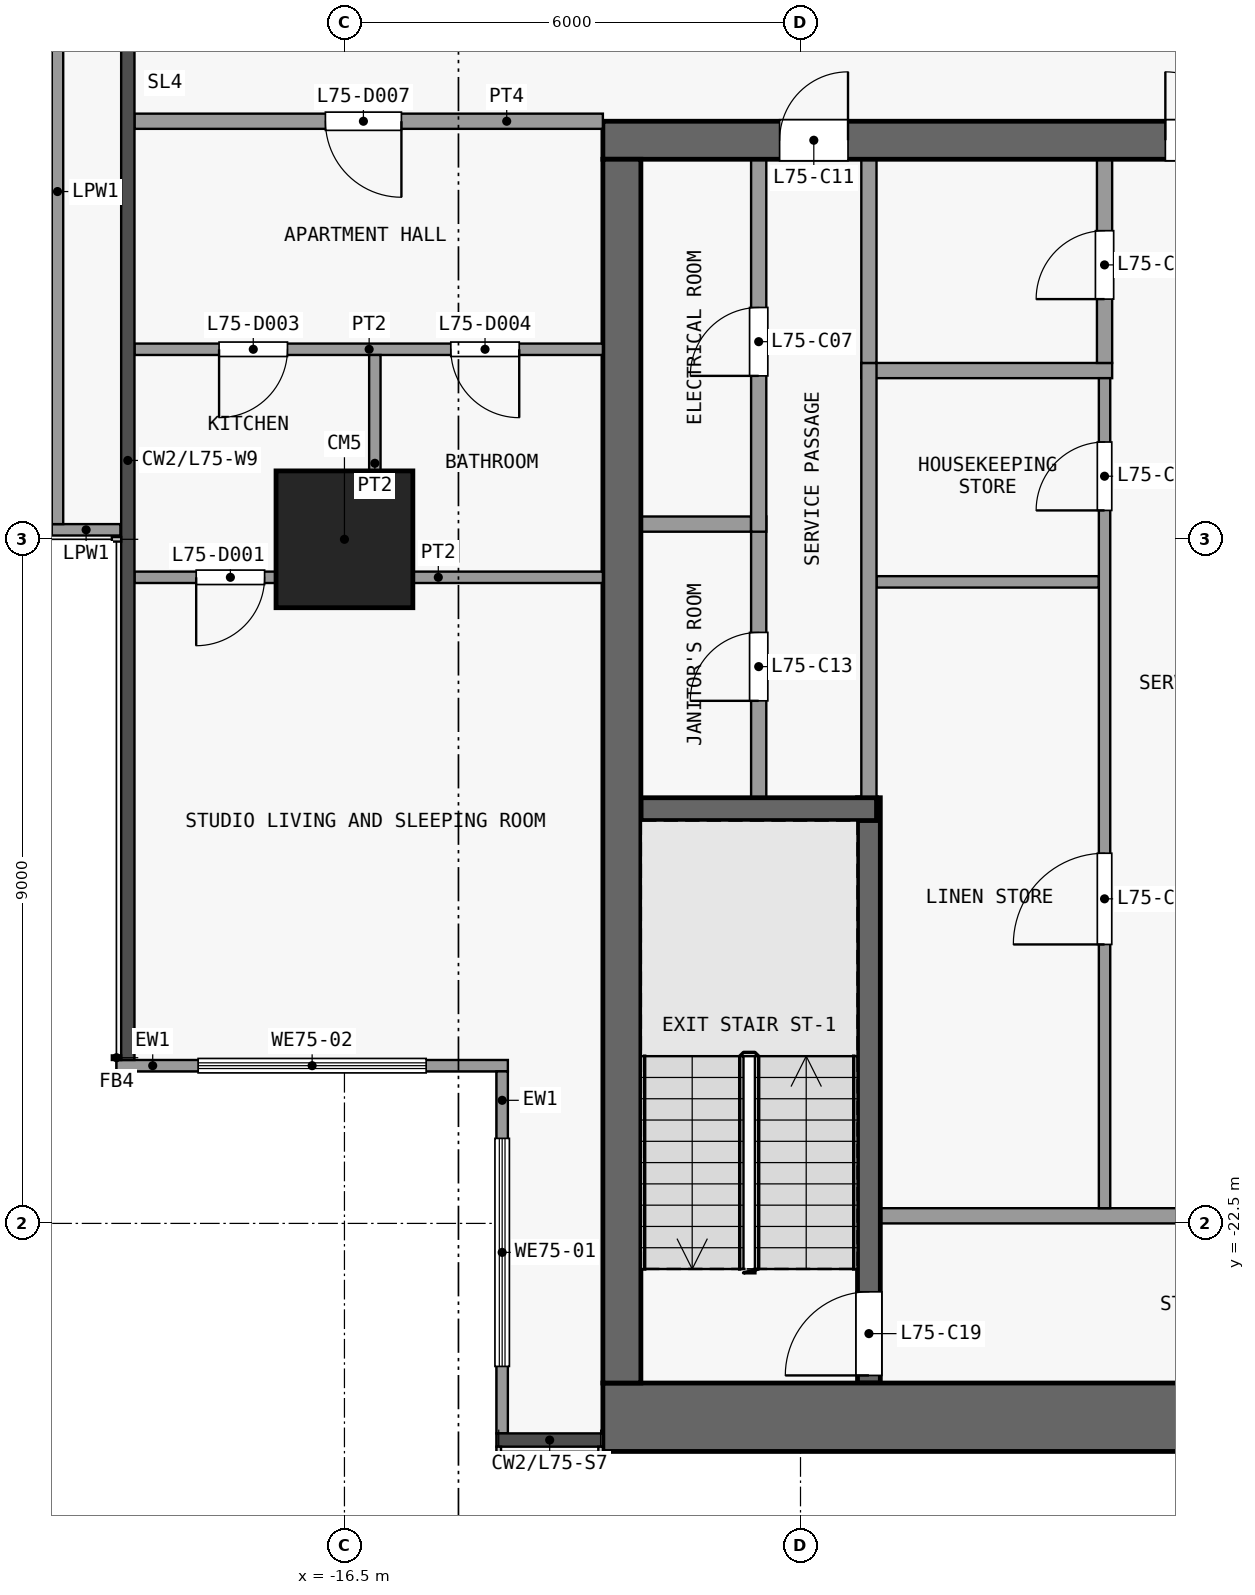
"""IFC4 building model, lengths in metres.
Left out: names, types, materials, properties, quantities, classifications, styles, units other than length and angle.
Written with IfcOpenShell. Run it as: python <this file> out.ifc"""

import sys

from ifc_helpers import new_model, si_unit, direction, frame, frame_2d, origin, origin_2d, place, context, subcontext, project, spatial, rectangle, extrude, element, fill, save


model = new_model("IFC4")
c1 = context("Model", 3, precision=1e-05, world=origin(), true_north=direction((0.0, 1.0)))
c2 = subcontext(c1, "Body", "Model", "MODEL_VIEW")
j1 = project(units=[si_unit("LENGTHUNIT", "METRE"), si_unit("PLANEANGLEUNIT", "RADIAN")], contexts=[c1])
p1 = place(None, origin())
s1 = spatial("IfcSite", under=j1, at=p1, CompositionType="ELEMENT")
p2 = place(p1, origin())
s2 = spatial("IfcBuilding", under=s1, at=p2, CompositionType="ELEMENT")
p3 = place(p2, frame((0.0, 0.0, 295.1)))
s3 = spatial("IfcBuildingStorey", under=s2, at=p3, CompositionType="ELEMENT", Elevation=295.1)
p4 = place(p3, frame((-16.5, -13.5, 0.0), z_axis=(0.0, 0.0, 1.0), x_axis=(1.0, 0.0, 0.0)))
e1 = element("IfcColumn", 1, at=p4, inside=s3, PredefinedType="COLUMN", context=c2, shape_type="SweptSolid", body=[
    extrude(rectangle(XDim=1.8, YDim=1.8, at=origin_2d()), origin(), (0.0, 0.0, 1.0), 3.6),
])
p5 = place(p3, frame((-13.1, -25.05, 0.0), z_axis=(0.0, 0.0, 1.0), x_axis=(1.0, 0.0, 0.0)))
e2 = element("IfcWall", 2, at=p5, inside=s3, PredefinedType="SHEAR", context=c2, shape_type="SweptSolid", body=[
    extrude(rectangle(XDim=26.2, YDim=0.9, at=frame_2d((13.1, 0.0))), origin(), (0.0, 0.0, 1.0), 3.2),
])
p6 = place(p3, frame((-13.1, -8.25, 0.0), z_axis=(0.0, 0.0, 1.0), x_axis=(1.0, 0.0, 0.0)))
e3 = element("IfcWall", 3, at=p6, inside=s3, PredefinedType="SHEAR", context=c2, shape_type="SweptSolid", body=[
    extrude(rectangle(XDim=26.2, YDim=0.5, at=frame_2d((13.1, 0.0))), origin(), (0.0, 0.0, 1.0), 3.2),
])
p7 = place(p6, frame((7.4, 0.0, 0.0)))
e4 = element("IfcOpeningElement", 4, at=p7, cuts=e3, PredefinedType="OPENING", context=c2, shape_type="SweptSolid", body=[
    extrude(rectangle(XDim=1.8, YDim=2.1, at=frame_2d((0.9, 1.05))), frame((0.0, 0.26, 0.0), z_axis=(0.0, -1.0, 0.0), x_axis=(1.0, 0.0, 0.0)), (0.0, 0.0, 1.0), 0.52),
])
p8 = place(p6, frame((17.0, 0.0, 0.0)))
e5 = element("IfcOpeningElement", 5, at=p8, cuts=e3, PredefinedType="OPENING", context=c2, shape_type="SweptSolid", body=[
    extrude(rectangle(XDim=1.8, YDim=2.1, at=frame_2d((0.9, 1.05))), frame((0.0, 0.26, 0.0), z_axis=(0.0, -1.0, 0.0), x_axis=(1.0, 0.0, 0.0)), (0.0, 0.0, 1.0), 0.52),
])
p9 = place(p6, frame((2.325, 0.0, 0.0)))
e6 = element("IfcOpeningElement", 6, at=p9, cuts=e3, PredefinedType="OPENING", context=c2, shape_type="SweptSolid", body=[
    extrude(rectangle(XDim=0.9, YDim=2.1, at=frame_2d((0.45, 1.05))), frame((0.0, 0.26, 0.0), z_axis=(0.0, -1.0, 0.0), x_axis=(1.0, 0.0, 0.0)), (0.0, 0.0, 1.0), 0.52),
])
p10 = place(p6, frame((22.975, 0.0, 0.0)))
e7 = element("IfcOpeningElement", 7, at=p10, cuts=e3, PredefinedType="OPENING", context=c2, shape_type="SweptSolid", body=[
    extrude(rectangle(XDim=0.9, YDim=2.1, at=frame_2d((0.45, 1.05))), frame((0.0, 0.26, 0.0), z_axis=(0.0, -1.0, 0.0), x_axis=(1.0, 0.0, 0.0)), (0.0, 0.0, 1.0), 0.52),
])
p11 = place(p3, frame((-12.85, -24.6, 0.0), z_axis=(0.0, 0.0, 1.0), x_axis=(0.0, 1.0, 0.0)))
e8 = element("IfcWall", 8, at=p11, inside=s3, PredefinedType="SHEAR", context=c2, shape_type="SweptSolid", body=[
    extrude(rectangle(XDim=16.1, YDim=0.5, at=frame_2d((8.05, 0.0))), origin(), (0.0, 0.0, 1.0), 3.2),
])
p12 = place(p3, frame((-3.25, -22.4, 0.0), z_axis=(0.0, 0.0, 1.0), x_axis=(-1.0, 0.0, 0.0)))
e9 = element("IfcWall", 9, at=p12, inside=s3, PredefinedType="PARTITIONING", context=c2, shape_type="SweptSolid", body=[
    extrude(rectangle(XDim=6.2, YDim=0.2, at=frame_2d((3.1, 0.0))), origin(), (0.0, 0.0, 1.0), 3.2),
])
p13 = place(p12, frame((0.8, 0.0, 0.0)))
e10 = element("IfcOpeningElement", 10, at=p13, cuts=e9, PredefinedType="OPENING", context=c2, shape_type="SweptSolid", body=[
    extrude(rectangle(XDim=1.5, YDim=2.1, at=frame_2d((0.75, 1.05))), frame((0.0, 0.11, 0.0), z_axis=(0.0, -1.0, 0.0), x_axis=(1.0, 0.0, 0.0)), (0.0, 0.0, 1.0), 0.22),
])
p14 = place(p3, frame((-12.6, -17.05, 0.0), z_axis=(0.0, 0.0, 1.0), x_axis=(1.0, 0.0, 0.0)))
e11 = element("IfcWall", 11, at=p14, inside=s3, PredefinedType="SHEAR", context=c2, shape_type="SweptSolid", body=[
    extrude(rectangle(XDim=3.1, YDim=0.3, at=frame_2d((1.55, 0.0))), origin(), (0.0, 0.0, 1.0), 3.2),
])
p15 = place(p3, frame((-9.5, -14.06, 0.0), z_axis=(0.0, 0.0, 1.0), x_axis=(1.0, 0.0, 0.0)))
e12 = element("IfcWall", 12, at=p15, inside=s3, PredefinedType="PARTITIONING", context=c2, shape_type="SweptSolid", body=[
    extrude(rectangle(XDim=2.925, YDim=0.15, at=frame_2d((1.462, 0.0))), origin(), (0.0, 0.0, 1.0), 3.2),
])
p16 = place(p3, frame((-12.6, -13.3, 0.0), z_axis=(0.0, 0.0, 1.0), x_axis=(1.0, 0.0, 0.0)))
e13 = element("IfcWall", 13, at=p16, inside=s3, PredefinedType="PARTITIONING", context=c2, shape_type="SweptSolid", body=[
    extrude(rectangle(XDim=1.45, YDim=0.2, at=frame_2d((0.725, 0.0))), origin(), (0.0, 0.0, 1.0), 3.2),
])
p17 = place(p3, frame((-9.7, -11.28, 0.0), z_axis=(0.0, 0.0, 1.0), x_axis=(1.0, 0.0, 0.0)))
e14 = element("IfcWall", 14, at=p17, inside=s3, PredefinedType="PARTITIONING", context=c2, shape_type="SweptSolid", body=[
    extrude(rectangle(XDim=3.3, YDim=0.2, at=frame_2d((1.65, 0.0))), origin(), (0.0, 0.0, 1.0), 3.2),
])
p18 = place(p3, frame((-11.05, -16.9, 0.0), z_axis=(0.0, 0.0, 1.0), x_axis=(0.0, 1.0, 0.0)))
e15 = element("IfcWall", 15, at=p18, inside=s3, PredefinedType="PARTITIONING", context=c2, shape_type="SweptSolid", body=[
    extrude(rectangle(XDim=3.7, YDim=0.2, at=frame_2d((1.85, 0.0))), origin(), (0.0, 0.0, 1.0), 3.2),
])
p19 = place(p18, frame((1.275, 0.0, 0.0)))
e16 = element("IfcOpeningElement", 16, at=p19, cuts=e15, PredefinedType="OPENING", context=c2, shape_type="SweptSolid", body=[
    extrude(rectangle(XDim=0.9, YDim=2.1, at=frame_2d((0.45, 1.05))), frame((0.0, 0.11, 0.0), z_axis=(0.0, -1.0, 0.0), x_axis=(1.0, 0.0, 0.0)), (0.0, 0.0, 1.0), 0.22),
])
p20 = place(p3, frame((-11.05, -13.4, 0.0), z_axis=(0.0, 0.0, 1.0), x_axis=(0.0, 1.0, 0.0)))
e17 = element("IfcWall", 17, at=p20, inside=s3, PredefinedType="PARTITIONING", context=c2, shape_type="SweptSolid", body=[
    extrude(rectangle(XDim=4.9, YDim=0.2, at=frame_2d((2.45, 0.0))), origin(), (0.0, 0.0, 1.0), 3.2),
])
p21 = place(p20, frame((2.05, 0.0, 0.0)))
e18 = element("IfcOpeningElement", 18, at=p21, cuts=e17, PredefinedType="OPENING", context=c2, shape_type="SweptSolid", body=[
    extrude(rectangle(XDim=0.9, YDim=2.1, at=frame_2d((0.45, 1.05))), frame((0.0, 0.11, 0.0), z_axis=(0.0, -1.0, 0.0), x_axis=(1.0, 0.0, 0.0)), (0.0, 0.0, 1.0), 0.22),
])
p22 = place(p3, frame((-9.6, -24.6, 0.0), z_axis=(0.0, 0.0, 1.0), x_axis=(0.0, 1.0, 0.0)))
e19 = element("IfcWall", 19, at=p22, inside=s3, PredefinedType="SHEAR", context=c2, shape_type="SweptSolid", body=[
    extrude(rectangle(XDim=7.7, YDim=0.3, at=frame_2d((3.85, 0.0))), origin(), (0.0, 0.0, 1.0), 3.2),
])
p23 = place(p22, frame((0.1, 0.0, 0.0)))
e20 = element("IfcOpeningElement", 20, at=p23, cuts=e19, PredefinedType="OPENING", context=c2, shape_type="SweptSolid", body=[
    extrude(rectangle(XDim=1.1, YDim=2.1, at=frame_2d((0.55, 1.05))), frame((0.0, 0.16, 0.0), z_axis=(0.0, -1.0, 0.0), x_axis=(1.0, 0.0, 0.0)), (0.0, 0.0, 1.0), 0.32),
])
p24 = place(p3, frame((-9.6, -16.9, 0.0), z_axis=(0.0, 0.0, 1.0), x_axis=(0.0, 1.0, 0.0)))
e21 = element("IfcWall", 21, at=p24, inside=s3, PredefinedType="PARTITIONING", context=c2, shape_type="SweptSolid", body=[
    extrude(rectangle(XDim=5.72, YDim=0.2, at=frame_2d((2.86, 0.0))), origin(), (0.0, 0.0, 1.0), 3.2),
])
p25 = place(p3, frame((-9.6, -11.18, 0.0), z_axis=(0.0, 0.0, 1.0), x_axis=(0.0, 1.0, 0.0)))
e22 = element("IfcWall", 22, at=p25, inside=s3, PredefinedType="PARTITIONING", context=c2, shape_type="SweptSolid", body=[
    extrude(rectangle(XDim=2.68, YDim=0.2, at=frame_2d((1.34, 0.0))), origin(), (0.0, 0.0, 1.0), 3.2),
])
p26 = place(p3, frame((-6.5, -22.3, 0.0), z_axis=(0.0, 0.0, 1.0), x_axis=(0.0, 1.0, 0.0)))
e23 = element("IfcWall", 23, at=p26, inside=s3, PredefinedType="PARTITIONING", context=c2, shape_type="SweptSolid", body=[
    extrude(rectangle(XDim=10.92, YDim=0.15, at=frame_2d((5.46, 0.0))), origin(), (0.0, 0.0, 1.0), 3.2),
])
p27 = place(p26, frame((3.47, 0.0, 0.0)))
e24 = element("IfcOpeningElement", 24, at=p27, cuts=e23, PredefinedType="OPENING", context=c2, shape_type="SweptSolid", body=[
    extrude(rectangle(XDim=1.2, YDim=2.1, at=frame_2d((0.6, 1.05))), frame((0.0, 0.085, 0.0), z_axis=(0.0, -1.0, 0.0), x_axis=(1.0, 0.0, 0.0)), (0.0, 0.0, 1.0), 0.17),
])
p28 = place(p26, frame((9.18, 0.0, 0.0)))
e25 = element("IfcOpeningElement", 25, at=p28, cuts=e23, PredefinedType="OPENING", context=c2, shape_type="SweptSolid", body=[
    extrude(rectangle(XDim=0.9, YDim=2.1, at=frame_2d((0.45, 1.05))), frame((0.0, 0.085, 0.0), z_axis=(0.0, -1.0, 0.0), x_axis=(1.0, 0.0, 0.0)), (0.0, 0.0, 1.0), 0.17),
])
p29 = place(p3, frame((-6.5, -11.18, 0.0), z_axis=(0.0, 0.0, 1.0), x_axis=(0.0, 1.0, 0.0)))
e26 = element("IfcWall", 26, at=p29, inside=s3, PredefinedType="PARTITIONING", context=c2, shape_type="SweptSolid", body=[
    extrude(rectangle(XDim=2.68, YDim=0.2, at=frame_2d((1.34, 0.0))), origin(), (0.0, 0.0, 1.0), 3.2),
])
p30 = place(p29, frame((0.84, 0.0, 0.0)))
e27 = element("IfcOpeningElement", 27, at=p30, cuts=e26, PredefinedType="OPENING", context=c2, shape_type="SweptSolid", body=[
    extrude(rectangle(XDim=0.9, YDim=2.1, at=frame_2d((0.45, 1.05))), frame((0.0, 0.11, 0.0), z_axis=(0.0, -1.0, 0.0), x_axis=(1.0, 0.0, 0.0)), (0.0, 0.0, 1.0), 0.22),
])
p31 = place(p3, frame((-14.425, -25.262, 0.0), z_axis=(0.0, 0.0, 1.0), x_axis=(0.0, 1.0, 0.0)))
e28 = element("IfcWall", 28, at=p31, inside=s3, PredefinedType="SOLIDWALL", context=c2, shape_type="SweptSolid", body=[
    extrude(rectangle(XDim=4.762, YDim=0.15, at=frame_2d((2.381, 0.0))), origin(), (0.0, 0.0, 1.0), 3.2),
])
p32 = place(p31, frame((0.881, 0.0, 0.9)))
e29 = element("IfcOpeningElement", 29, at=p32, cuts=e28, PredefinedType="OPENING", context=c2, shape_type="SweptSolid", body=[
    extrude(rectangle(XDim=3.0, YDim=2.4, at=frame_2d((1.5, 1.2))), frame((0.0, 0.085, 0.0), z_axis=(0.0, -1.0, 0.0), x_axis=(1.0, 0.0, 0.0)), (0.0, 0.0, 1.0), 0.17),
])
p33 = place(p3, frame((-14.35, -20.425, 0.0), z_axis=(0.0, 0.0, 1.0), x_axis=(-1.0, 0.0, 0.0)))
e30 = element("IfcWall", 30, at=p33, inside=s3, PredefinedType="SOLIDWALL", context=c2, shape_type="SweptSolid", body=[
    extrude(rectangle(XDim=5.15, YDim=0.15, at=frame_2d((2.575, 0.0))), origin(), (0.0, 0.0, 1.0), 3.2),
])
p34 = place(p33, frame((1.075, 0.0, 0.9)))
e31 = element("IfcOpeningElement", 31, at=p34, cuts=e30, PredefinedType="OPENING", context=c2, shape_type="SweptSolid", body=[
    extrude(rectangle(XDim=3.0, YDim=2.4, at=frame_2d((1.5, 1.2))), frame((0.0, 0.085, 0.0), z_axis=(0.0, -1.0, 0.0), x_axis=(1.0, 0.0, 0.0)), (0.0, 0.0, 1.0), 0.17),
])
p35 = place(p3, frame((-19.448, -13.375, 0.0), z_axis=(0.0, 0.0, 1.0), x_axis=(-1.0, 0.0, 0.0)))
e32 = element("IfcWall", 32, at=p35, inside=s3, PredefinedType="PARAPET", context=c2, shape_type="SweptSolid", body=[
    extrude(rectangle(XDim=0.903, YDim=0.15, at=frame_2d((0.451, 0.0))), origin(), (0.0, 0.0, 1.0), 1.15),
])
p36 = place(p3, frame((-20.275, -13.3, 0.0), z_axis=(0.0, 0.0, 1.0), x_axis=(0.0, 1.0, 0.0)))
e33 = element("IfcWall", 33, at=p36, inside=s3, PredefinedType="PARAPET", context=c2, shape_type="SweptSolid", body=[
    extrude(rectangle(XDim=8.75, YDim=0.15, at=frame_2d((4.375, 0.0))), origin(), (0.0, 0.0, 1.0), 1.15),
])
p37 = place(p3, frame((-19.262, -14.0, 0.0), z_axis=(0.0, 0.0, 1.0), x_axis=(1.0, 0.0, 0.0)))
e34 = element("IfcWall", 34, at=p37, inside=s3, PredefinedType="PARTITIONING", context=c2, shape_type="SweptSolid", body=[
    extrude(rectangle(XDim=6.162, YDim=0.15, at=frame_2d((3.081, 0.0))), origin(), (0.0, 0.0, 1.0), 3.2),
])
p38 = place(p37, frame((0.812, 0.0, 0.0)))
e35 = element("IfcOpeningElement", 35, at=p38, cuts=e34, PredefinedType="OPENING", context=c2, shape_type="SweptSolid", body=[
    extrude(rectangle(XDim=0.9, YDim=2.1, at=frame_2d((0.45, 1.05))), frame((0.0, 0.085, 0.0), z_axis=(0.0, -1.0, 0.0), x_axis=(1.0, 0.0, 0.0)), (0.0, 0.0, 1.0), 0.17),
])
p39 = place(p3, frame((-19.262, -11.0, 0.0), z_axis=(0.0, 0.0, 1.0), x_axis=(1.0, 0.0, 0.0)))
e36 = element("IfcWall", 36, at=p39, inside=s3, PredefinedType="PARTITIONING", context=c2, shape_type="SweptSolid", body=[
    extrude(rectangle(XDim=6.162, YDim=0.15, at=frame_2d((3.081, 0.0))), origin(), (0.0, 0.0, 1.0), 3.2),
])
p40 = place(p39, frame((1.113, 0.0, 0.0)))
e37 = element("IfcOpeningElement", 37, at=p40, cuts=e36, PredefinedType="OPENING", context=c2, shape_type="SweptSolid", body=[
    extrude(rectangle(XDim=0.9, YDim=2.1, at=frame_2d((0.45, 1.05))), frame((0.0, 0.085, 0.0), z_axis=(0.0, -1.0, 0.0), x_axis=(1.0, 0.0, 0.0)), (0.0, 0.0, 1.0), 0.17),
])
p41 = place(p39, frame((4.162, 0.0, 0.0)))
e38 = element("IfcOpeningElement", 38, at=p41, cuts=e36, PredefinedType="OPENING", context=c2, shape_type="SweptSolid", body=[
    extrude(rectangle(XDim=0.9, YDim=2.1, at=frame_2d((0.45, 1.05))), frame((0.0, 0.085, 0.0), z_axis=(0.0, -1.0, 0.0), x_axis=(1.0, 0.0, 0.0)), (0.0, 0.0, 1.0), 0.17),
])
p42 = place(p3, frame((-19.262, -8.0, 0.0), z_axis=(0.0, 0.0, 1.0), x_axis=(1.0, 0.0, 0.0)))
e39 = element("IfcWall", 39, at=p42, inside=s3, PredefinedType="PARTITIONING", context=c2, shape_type="SweptSolid", body=[
    extrude(rectangle(XDim=6.162, YDim=0.2, at=frame_2d((3.081, 0.0))), origin(), (0.0, 0.0, 1.0), 3.2),
])
p43 = place(p42, frame((2.512, 0.0, 0.0)))
e40 = element("IfcOpeningElement", 40, at=p43, cuts=e39, PredefinedType="OPENING", context=c2, shape_type="SweptSolid", body=[
    extrude(rectangle(XDim=1.0, YDim=2.1, at=frame_2d((0.5, 1.05))), frame((0.0, 0.11, 0.0), z_axis=(0.0, -1.0, 0.0), x_axis=(1.0, 0.0, 0.0)), (0.0, 0.0, 1.0), 0.22),
])
p44 = place(p3, frame((-16.1, -13.925, 0.0), z_axis=(0.0, 0.0, 1.0), x_axis=(0.0, 1.0, 0.0)))
e41 = element("IfcWall", 41, at=p44, inside=s3, PredefinedType="PARTITIONING", context=c2, shape_type="SweptSolid", body=[
    extrude(rectangle(XDim=2.85, YDim=0.15, at=frame_2d((1.425, 0.0))), origin(), (0.0, 0.0, 1.0), 3.2),
])
p45 = place(p7, origin())
e42 = element("IfcDoor", 42, at=p45, inside=s3, OperationType="DOUBLE_DOOR_SINGLE_SWING", PredefinedType="DOOR", context=c2, shape_type="SweptSolid", body=[
    extrude(rectangle(XDim=1.8, YDim=2.1, at=frame_2d((0.9, 1.05))), frame((0.0, 0.025, 0.0), z_axis=(0.0, -1.0, 0.0), x_axis=(1.0, 0.0, 0.0)), (0.0, 0.0, 1.0), 0.05),
])
fill(e4, e42)
p46 = place(p21, origin())
e43 = element("IfcDoor", 43, at=p46, inside=s3, OperationType="SINGLE_SWING_LEFT", PredefinedType="DOOR", context=c2, shape_type="SweptSolid", body=[
    extrude(rectangle(XDim=0.9, YDim=2.1, at=frame_2d((0.45, 1.05))), frame((0.0, 0.025, 0.0), z_axis=(0.0, -1.0, 0.0), x_axis=(1.0, 0.0, 0.0)), (0.0, 0.0, 1.0), 0.05),
])
fill(e18, e43)
p47 = place(p30, origin())
e44 = element("IfcDoor", 44, at=p47, inside=s3, OperationType="SINGLE_SWING_LEFT", PredefinedType="DOOR", context=c2, shape_type="SweptSolid", body=[
    extrude(rectangle(XDim=0.9, YDim=2.1, at=frame_2d((0.45, 1.05))), frame((0.0, 0.025, 0.0), z_axis=(0.0, -1.0, 0.0), x_axis=(1.0, 0.0, 0.0)), (0.0, 0.0, 1.0), 0.05),
])
fill(e27, e44)
p48 = place(p9, origin())
e45 = element("IfcDoor", 45, at=p48, inside=s3, OperationType="SINGLE_SWING_RIGHT", PredefinedType="DOOR", context=c2, shape_type="SweptSolid", body=[
    extrude(rectangle(XDim=0.9, YDim=2.1, at=frame_2d((0.45, 1.05))), frame((0.0, 0.025, 0.0), z_axis=(0.0, -1.0, 0.0), x_axis=(1.0, 0.0, 0.0)), (0.0, 0.0, 1.0), 0.05),
])
fill(e6, e45)
p49 = place(p19, origin())
e46 = element("IfcDoor", 46, at=p49, inside=s3, OperationType="SINGLE_SWING_LEFT", PredefinedType="DOOR", context=c2, shape_type="SweptSolid", body=[
    extrude(rectangle(XDim=0.9, YDim=2.1, at=frame_2d((0.45, 1.05))), frame((0.0, 0.025, 0.0), z_axis=(0.0, -1.0, 0.0), x_axis=(1.0, 0.0, 0.0)), (0.0, 0.0, 1.0), 0.05),
])
fill(e16, e46)
p50 = place(p27, origin())
e47 = element("IfcDoor", 47, at=p50, inside=s3, OperationType="SINGLE_SWING_LEFT", PredefinedType="DOOR", context=c2, shape_type="SweptSolid", body=[
    extrude(rectangle(XDim=1.2, YDim=2.1, at=frame_2d((0.6, 1.05))), frame((0.0, 0.025, 0.0), z_axis=(0.0, -1.0, 0.0), x_axis=(1.0, 0.0, 0.0)), (0.0, 0.0, 1.0), 0.05),
])
fill(e24, e47)
p51 = place(p28, origin())
e48 = element("IfcDoor", 48, at=p51, inside=s3, OperationType="SINGLE_SWING_LEFT", PredefinedType="DOOR", context=c2, shape_type="SweptSolid", body=[
    extrude(rectangle(XDim=0.9, YDim=2.1, at=frame_2d((0.45, 1.05))), frame((0.0, 0.025, 0.0), z_axis=(0.0, -1.0, 0.0), x_axis=(1.0, 0.0, 0.0)), (0.0, 0.0, 1.0), 0.05),
])
fill(e25, e48)
p52 = place(p23, origin())
e49 = element("IfcDoor", 49, at=p52, inside=s3, OperationType="SINGLE_SWING_LEFT", PredefinedType="DOOR", context=c2, shape_type="SweptSolid", body=[
    extrude(rectangle(XDim=1.1, YDim=2.1, at=frame_2d((0.55, 1.05))), frame((0.0, 0.025, 0.0), z_axis=(0.0, -1.0, 0.0), x_axis=(1.0, 0.0, 0.0)), (0.0, 0.0, 1.0), 0.05),
])
fill(e20, e49)
p53 = place(p32, origin())
e50 = element("IfcWindow", 50, at=p53, inside=s3, PartitioningType="SINGLE_PANEL", PredefinedType="WINDOW", context=c2, shape_type="SweptSolid", body=[
    extrude(rectangle(XDim=3.0, YDim=2.4, at=frame_2d((1.5, 1.2))), frame((0.0, 0.03, 0.0), z_axis=(0.0, -1.0, 0.0), x_axis=(1.0, 0.0, 0.0)), (0.0, 0.0, 1.0), 0.06),
])
fill(e29, e50)
p54 = place(p34, origin())
e51 = element("IfcWindow", 51, at=p54, inside=s3, PartitioningType="SINGLE_PANEL", PredefinedType="WINDOW", context=c2, shape_type="SweptSolid", body=[
    extrude(rectangle(XDim=3.0, YDim=2.4, at=frame_2d((1.5, 1.2))), frame((0.0, 0.03, 0.0), z_axis=(0.0, -1.0, 0.0), x_axis=(1.0, 0.0, 0.0)), (0.0, 0.0, 1.0), 0.06),
])
fill(e31, e51)
p55 = place(p38, origin())
e52 = element("IfcDoor", 52, at=p55, inside=s3, OperationType="SINGLE_SWING_LEFT", PredefinedType="DOOR", context=c2, shape_type="SweptSolid", body=[
    extrude(rectangle(XDim=0.9, YDim=2.1, at=frame_2d((0.45, 1.05))), frame((0.0, 0.025, 0.0), z_axis=(0.0, -1.0, 0.0), x_axis=(1.0, 0.0, 0.0)), (0.0, 0.0, 1.0), 0.05),
])
fill(e35, e52)
p56 = place(p40, origin())
e53 = element("IfcDoor", 53, at=p56, inside=s3, OperationType="SINGLE_SWING_LEFT", PredefinedType="DOOR", context=c2, shape_type="SweptSolid", body=[
    extrude(rectangle(XDim=0.9, YDim=2.1, at=frame_2d((0.45, 1.05))), frame((0.0, 0.025, 0.0), z_axis=(0.0, -1.0, 0.0), x_axis=(1.0, 0.0, 0.0)), (0.0, 0.0, 1.0), 0.05),
])
fill(e37, e53)
p57 = place(p41, origin())
e54 = element("IfcDoor", 54, at=p57, inside=s3, OperationType="SINGLE_SWING_RIGHT", PredefinedType="DOOR", context=c2, shape_type="SweptSolid", body=[
    extrude(rectangle(XDim=0.9, YDim=2.1, at=frame_2d((0.45, 1.05))), frame((0.0, 0.025, 0.0), z_axis=(0.0, -1.0, 0.0), x_axis=(1.0, 0.0, 0.0)), (0.0, 0.0, 1.0), 0.05),
])
fill(e38, e54)
p58 = place(p43, origin())
e55 = element("IfcDoor", 55, at=p58, inside=s3, OperationType="SINGLE_SWING_RIGHT", PredefinedType="DOOR", context=c2, shape_type="SweptSolid", body=[
    extrude(rectangle(XDim=1.0, YDim=2.1, at=frame_2d((0.5, 1.05))), frame((0.0, 0.025, 0.0), z_axis=(0.0, -1.0, 0.0), x_axis=(1.0, 0.0, 0.0)), (0.0, 0.0, 1.0), 0.05),
])
fill(e40, e55)
save(model, sys.argv[1])
